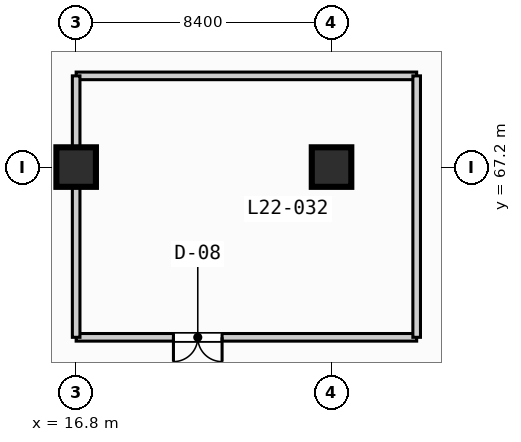
"""IFC4 building model, lengths in metres.
Left out: names, types, materials, properties, quantities, classifications, styles, units other than length and angle.
Written with IfcOpenShell. Run it as: python <this file> out.ifc"""

import sys

from ifc_helpers import new_model, si_unit, direction, frame, frame_2d, origin, origin_2d, place, context, subcontext, project, spatial, rectangle, extrude, element, fill, save


model = new_model("IFC4")
c1 = context("Model", 3, precision=1e-05, world=origin(), true_north=direction((0.0, 1.0)))
c2 = subcontext(c1, "Body", "Model", "MODEL_VIEW")
j1 = project(units=[si_unit("LENGTHUNIT", "METRE"), si_unit("PLANEANGLEUNIT", "RADIAN")], contexts=[c1])
p1 = place(None, origin())
s1 = spatial("IfcSite", under=j1, at=p1, CompositionType="ELEMENT")
p2 = place(p1, origin())
s2 = spatial("IfcBuilding", under=s1, at=p2, CompositionType="ELEMENT")
p3 = place(p2, frame((0.0, 0.0, 94.0)))
s3 = spatial("IfcBuildingStorey", under=s2, at=p3, CompositionType="ELEMENT", Elevation=94.0)
for number, where, z_axis, x_axis in (
    (1, (16.8, 67.2, 0.0), (0.0, 0.0, 1.0), (1.0, 0.0, 0.0)),
    (2, (25.2, 67.2, 0.0), (0.0, 0.0, 1.0), (1.0, 0.0, 0.0)),
):
    element("IfcColumn", number, at=place(p3, frame(where, z_axis=z_axis, x_axis=x_axis)), inside=s3, PredefinedType="COLUMN", context=c2, shape_type="SweptSolid", body=[
        extrude(rectangle(XDim=1.3, YDim=1.3, at=origin_2d()), origin(), (0.0, 0.0, 1.0), 6.0),
    ])
p4 = place(p3, frame((16.8, 61.6, 0.0), z_axis=(0.0, 0.0, 1.0), x_axis=(1.0, 0.0, 0.0)))
e3 = element("IfcWall", 3, at=p4, inside=s3, PredefinedType="SOLIDWALL", context=c2, shape_type="SweptSolid", body=[
    extrude(rectangle(XDim=11.2, YDim=0.25, at=frame_2d((5.6, 0.0))), origin(), (0.0, 0.0, 1.0), 5.75),
])
p5 = place(p4, frame((3.2, 0.0, 0.0)))
e4 = element("IfcOpeningElement", 4, at=p5, cuts=e3, PredefinedType="OPENING", context=c2, shape_type="SweptSolid", body=[
    extrude(rectangle(XDim=1.6, YDim=2.2, at=frame_2d((0.8, 1.1))), frame((0.0, 0.135, 0.0), z_axis=(0.0, -1.0, 0.0), x_axis=(1.0, 0.0, 0.0)), (0.0, 0.0, 1.0), 0.27),
])
p6 = place(p3, frame((16.8, 70.2, 0.0), z_axis=(0.0, 0.0, 1.0), x_axis=(1.0, 0.0, 0.0)))
e5 = element("IfcWall", 5, at=p6, inside=s3, PredefinedType="SOLIDWALL", context=c2, shape_type="SweptSolid", body=[
    extrude(rectangle(XDim=11.2, YDim=0.25, at=frame_2d((5.6, 0.0))), origin(), (0.0, 0.0, 1.0), 5.75),
])
p7 = place(p3, frame((16.8, 61.6, 0.0), z_axis=(0.0, 0.0, 1.0), x_axis=(0.0, 1.0, 0.0)))
e6 = element("IfcWall", 6, at=p7, inside=s3, PredefinedType="SOLIDWALL", context=c2, shape_type="SweptSolid", body=[
    extrude(rectangle(XDim=8.6, YDim=0.25, at=frame_2d((4.3, 0.0))), origin(), (0.0, 0.0, 1.0), 5.0),
])
p8 = place(p3, frame((28.0, 61.6, 0.0), z_axis=(0.0, 0.0, 1.0), x_axis=(0.0, 1.0, 0.0)))
e7 = element("IfcWall", 7, at=p8, inside=s3, PredefinedType="SOLIDWALL", context=c2, shape_type="SweptSolid", body=[
    extrude(rectangle(XDim=8.6, YDim=0.25, at=frame_2d((4.3, 0.0))), origin(), (0.0, 0.0, 1.0), 5.75),
])
p9 = place(p5, origin())
e8 = element("IfcDoor", 8, at=p9, inside=s3, OperationType="SINGLE_SWING_RIGHT", PredefinedType="DOOR", context=c2, shape_type="SweptSolid", body=[
    extrude(rectangle(XDim=1.6, YDim=2.2, at=frame_2d((0.8, 1.1))), frame((0.0, 0.025, 0.0), z_axis=(0.0, -1.0, 0.0), x_axis=(1.0, 0.0, 0.0)), (0.0, 0.0, 1.0), 0.05),
])
fill(e4, e8)
save(model, sys.argv[1])
